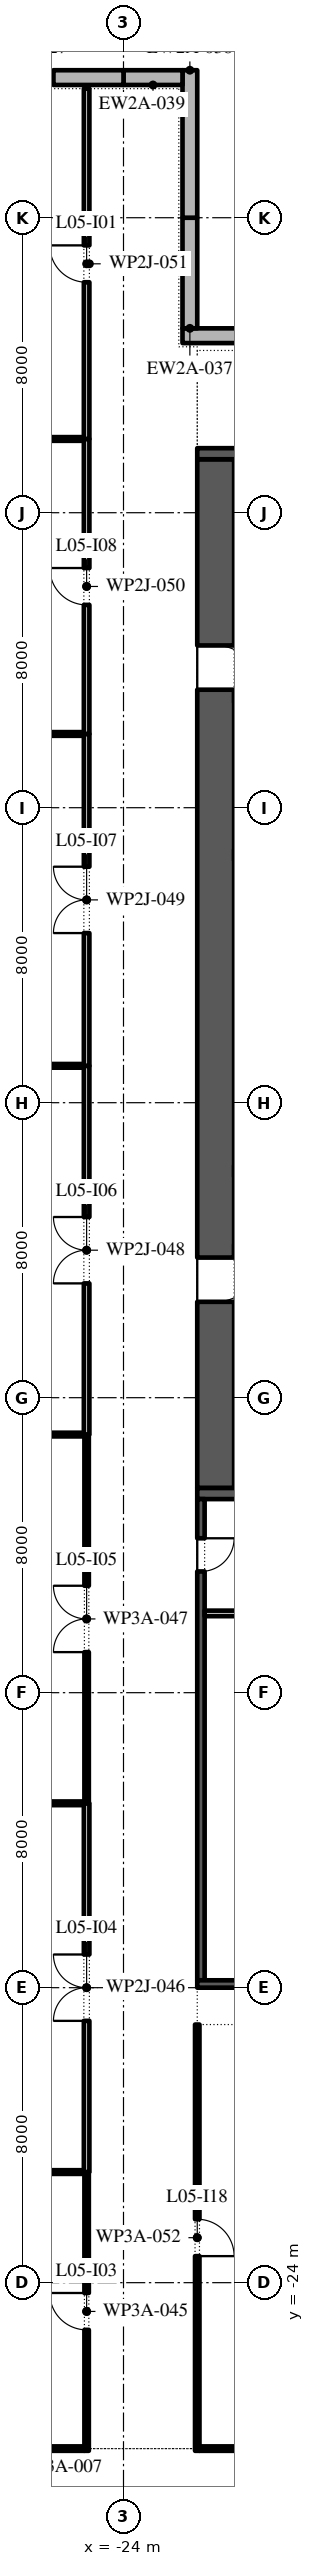
"""IFC4 building model, lengths in metres.
Left out: names, types, materials, properties, quantities, classifications, styles, units other than length and angle.
Written with IfcOpenShell. Run it as: python <this file> out.ifc"""

import sys

from ifc_helpers import new_model, si_unit, direction, frame, frame_2d, origin, place, context, subcontext, project, spatial, polyline, rectangle, outline, extrude, element, fill, save


model = new_model("IFC4")
c1 = context("Model", 3, precision=1e-05, world=origin(), true_north=direction((0.0, 1.0)))
c2 = subcontext(c1, "Body", "Model", "MODEL_VIEW")
j1 = project(units=[si_unit("LENGTHUNIT", "METRE"), si_unit("PLANEANGLEUNIT", "RADIAN")], contexts=[c1])
p1 = place(None, origin())
s1 = spatial("IfcSite", under=j1, at=p1, CompositionType="ELEMENT")
p2 = place(p1, origin())
s2 = spatial("IfcBuilding", under=s1, at=p2, CompositionType="ELEMENT")
p3 = place(p2, frame((0.0, 0.0, 28.8)))
s3 = spatial("IfcBuildingStorey", under=s2, at=p3, CompositionType="ELEMENT", Elevation=28.8)
p4 = place(p3, frame((-16.0, 28.8, 0.0), z_axis=(0.0, 0.0, 1.0), x_axis=(-1.0, 0.0, 0.0)))
e1 = element("IfcWall", 1, at=p4, inside=s3, PredefinedType="STANDARD", context=c2, shape_type="SweptSolid", body=[
    extrude(rectangle(XDim=6.4, YDim=0.4, at=frame_2d((3.2, 0.0))), origin(), (0.0, 0.0, 1.0), 4.35),
])
p5 = place(p3, frame((-22.2, 29.0, 0.0), z_axis=(0.0, 0.0, 1.0), x_axis=(0.0, 1.0, 0.0)))
e2 = element("IfcWall", 2, at=p5, inside=s3, PredefinedType="STANDARD", context=c2, shape_type="SweptSolid", body=[
    extrude(rectangle(XDim=3.0, YDim=0.4, at=frame_2d((1.5, 0.0))), origin(), (0.0, 0.0, 1.0), 4.35),
])
p6 = place(p3, frame((-22.2, 32.0, 0.0), z_axis=(0.0, 0.0, 1.0), x_axis=(0.0, 1.0, 0.0)))
e3 = element("IfcWall", 3, at=p6, inside=s3, PredefinedType="STANDARD", context=c2, shape_type="SweptSolid", body=[
    extrude(rectangle(XDim=4.0, YDim=0.4, at=frame_2d((2.0, 0.0))), origin(), (0.0, 0.0, 1.0), 4.35),
])
p7 = place(p3, frame((-22.4, 35.8, 0.0), z_axis=(0.0, 0.0, 1.0), x_axis=(-1.0, 0.0, 0.0)))
e4 = element("IfcWall", 4, at=p7, inside=s3, PredefinedType="STANDARD", context=c2, shape_type="SweptSolid", body=[
    extrude(rectangle(XDim=1.6, YDim=0.4, at=frame_2d((0.8, 0.0))), origin(), (0.0, 0.0, 1.0), 4.35),
])
p8 = place(p3, frame((-24.0, 35.8, 0.0), z_axis=(0.0, 0.0, 1.0), x_axis=(-1.0, 0.0, 0.0)))
e5 = element("IfcWall", 5, at=p8, inside=s3, PredefinedType="STANDARD", context=c2, shape_type="SweptSolid", body=[
    extrude(rectangle(XDim=8.0, YDim=0.4, at=frame_2d((4.0, 0.0))), origin(), (0.0, 0.0, 1.0), 4.35),
])
p9 = place(p8, frame((1.9, 0.0, 0.9)))
e6 = element("IfcOpeningElement", 6, at=p9, cuts=e5, PredefinedType="OPENING", context=c2, shape_type="SweptSolid", body=[
    extrude(outline(polyline([(0.0, 0.0), (1.8, 0.0), (1.8, 1.425), (1.784, 1.646), (1.738, 1.864), (1.661, 2.072), (1.556, 2.268), (1.425, 2.447), (1.269, 2.605), (1.093, 2.741), (0.9, 2.85), (0.707, 2.741), (0.531, 2.605), (0.375, 2.447), (0.244, 2.268), (0.139, 2.072), (0.062, 1.864), (0.016, 1.646), (0.0, 1.425), (0.0, 0.0)])), frame((0.0, 0.21, 0.0), z_axis=(0.0, -1.0, 0.0), x_axis=(1.0, 0.0, 0.0)), (0.0, 0.0, 1.0), 0.42),
])
p10 = place(p8, frame((4.3, 0.0, 0.9)))
e7 = element("IfcOpeningElement", 7, at=p10, cuts=e5, PredefinedType="OPENING", context=c2, shape_type="SweptSolid", body=[
    extrude(outline(polyline([(0.0, 0.0), (1.8, 0.0), (1.8, 1.425), (1.784, 1.646), (1.738, 1.864), (1.661, 2.072), (1.556, 2.268), (1.425, 2.447), (1.269, 2.605), (1.093, 2.741), (0.9, 2.85), (0.707, 2.741), (0.531, 2.605), (0.375, 2.447), (0.244, 2.268), (0.139, 2.072), (0.062, 1.864), (0.016, 1.646), (0.0, 1.425), (0.0, 0.0)])), frame((0.0, 0.21, 0.0), z_axis=(0.0, -1.0, 0.0), x_axis=(1.0, 0.0, 0.0)), (0.0, 0.0, 1.0), 0.42),
])
p11 = place(p3, frame((-21.5, -2.45, 0.0), z_axis=(0.0, 0.0, 1.0), x_axis=(0.0, 1.0, 0.0)))
e8 = element("IfcWall", 8, at=p11, inside=s3, PredefinedType="SHEAR", context=c2, shape_type="SweptSolid", body=[
    extrude(rectangle(XDim=27.9, YDim=1.0, at=frame_2d((13.95, 0.0))), origin(), (0.0, 0.0, 1.0), 4.35),
])
p12 = place(p11, frame((5.05, 0.0, 0.0)))
e9 = element("IfcOpeningElement", 9, at=p12, cuts=e8, PredefinedType="OPENING", context=c2, shape_type="SweptSolid", body=[
    extrude(rectangle(XDim=1.2, YDim=2.1, at=frame_2d((0.6, 1.05))), frame((0.0, 0.51, 0.0), z_axis=(0.0, -1.0, 0.0), x_axis=(1.0, 0.0, 0.0)), (0.0, 0.0, 1.0), 1.02),
])
p13 = place(p11, frame((21.65, 0.0, 0.0)))
e10 = element("IfcOpeningElement", 10, at=p13, cuts=e8, PredefinedType="OPENING", context=c2, shape_type="SweptSolid", body=[
    extrude(rectangle(XDim=1.2, YDim=2.1, at=frame_2d((0.6, 1.05))), frame((0.0, 0.51, 0.0), z_axis=(0.0, -1.0, 0.0), x_axis=(1.0, 0.0, 0.0)), (0.0, 0.0, 1.0), 1.02),
])
for number, where, z_axis, x_axis in (
    (11, (-22.0, -2.6, 0.0), (0.0, 0.0, 1.0), (1.0, 0.0, 0.0)),
    (12, (-22.0, 25.6, 0.0), (0.0, 0.0, 1.0), (1.0, 0.0, 0.0)),
):
    element("IfcWall", number, at=place(p3, frame(where, z_axis=z_axis, x_axis=x_axis)), inside=s3, PredefinedType="SHEAR", context=c2, shape_type="SweptSolid", body=[
        extrude(rectangle(XDim=12.0, YDim=0.3, at=frame_2d((6.0, 0.0))), origin(), (0.0, 0.0, 1.0), 4.35),
    ])
p14 = place(p3, frame((-21.9, -15.8, 0.0), z_axis=(0.0, 0.0, 1.0), x_axis=(0.0, 1.0, 0.0)))
e13 = element("IfcWall", 13, at=p14, inside=s3, PredefinedType="SHEAR", context=c2, shape_type="SweptSolid", body=[
    extrude(rectangle(XDim=13.05, YDim=0.2, at=frame_2d((6.525, 0.0))), origin(), (0.0, 0.0, 1.0), 4.35),
])
p15 = place(p14, frame((11.087, 0.0, 0.0)))
e14 = element("IfcOpeningElement", 14, at=p15, cuts=e13, PredefinedType="OPENING", context=c2, shape_type="SweptSolid", body=[
    extrude(rectangle(XDim=0.9, YDim=2.1, at=frame_2d((0.45, 1.05))), frame((0.0, 0.11, 0.0), z_axis=(0.0, -1.0, 0.0), x_axis=(1.0, 0.0, 0.0)), (0.0, 0.0, 1.0), 0.22),
])
p16 = place(p3, frame((-22.0, -15.9, 0.0), z_axis=(0.0, 0.0, 1.0), x_axis=(1.0, 0.0, 0.0)))
e15 = element("IfcWall", 15, at=p16, inside=s3, PredefinedType="SHEAR", context=c2, shape_type="SweptSolid", body=[
    extrude(rectangle(XDim=12.0, YDim=0.2, at=frame_2d((6.0, 0.0))), origin(), (0.0, 0.0, 1.0), 4.35),
])
p17 = place(p3, frame((-21.8, -5.85, 0.0), z_axis=(0.0, 0.0, 1.0), x_axis=(1.0, 0.0, 0.0)))
e16 = element("IfcWall", 16, at=p17, inside=s3, PredefinedType="PARTITIONING", context=c2, shape_type="SweptSolid", body=[
    extrude(rectangle(XDim=11.6, YDim=0.15, at=frame_2d((5.8, 0.0))), origin(), (0.0, 0.0, 1.0), 4.35),
])
p18 = place(p3, frame((-27.0, -28.5, 0.0), z_axis=(0.0, 0.0, 1.0), x_axis=(1.0, 0.0, 0.0)))
e17 = element("IfcWall", 17, at=p18, inside=s3, PredefinedType="PARTITIONING", context=c2, shape_type="SweptSolid", body=[
    extrude(rectangle(XDim=1.94, YDim=0.12, at=frame_2d((0.97, 0.0))), origin(), (0.0, 0.0, 1.0), 4.35),
])
p19 = place(p3, frame((-21.94, -28.5, 0.0), z_axis=(0.0, 0.0, 1.0), x_axis=(1.0, 0.0, 0.0)))
e18 = element("IfcWall", 18, at=p19, inside=s3, PredefinedType="PARTITIONING", context=c2, shape_type="SweptSolid", body=[
    extrude(rectangle(XDim=11.54, YDim=0.12, at=frame_2d((5.77, 0.0))), origin(), (0.0, 0.0, 1.0), 4.35),
])
p20 = place(p3, frame((-43.5, -21.0, 0.0), z_axis=(0.0, 0.0, 1.0), x_axis=(1.0, 0.0, 0.0)))
e19 = element("IfcWall", 19, at=p20, inside=s3, PredefinedType="PARTITIONING", context=c2, shape_type="SweptSolid", body=[
    extrude(rectangle(XDim=18.425, YDim=0.1, at=frame_2d((9.212, 0.0))), origin(), (0.0, 0.0, 1.0), 4.35),
])
p21 = place(p3, frame((-31.7, -11.0, 0.0), z_axis=(0.0, 0.0, 1.0), x_axis=(1.0, 0.0, 0.0)))
e20 = element("IfcWall", 20, at=p21, inside=s3, PredefinedType="PARTITIONING", context=c2, shape_type="SweptSolid", body=[
    extrude(rectangle(XDim=6.625, YDim=0.1, at=frame_2d((3.312, 0.0))), origin(), (0.0, 0.0, 1.0), 4.35),
])
p22 = place(p3, frame((-43.5, -1.0, 0.0), z_axis=(0.0, 0.0, 1.0), x_axis=(1.0, 0.0, 0.0)))
e21 = element("IfcWall", 21, at=p22, inside=s3, PredefinedType="PARTITIONING", context=c2, shape_type="SweptSolid", body=[
    extrude(rectangle(XDim=18.425, YDim=0.1, at=frame_2d((9.212, 0.0))), origin(), (0.0, 0.0, 1.0), 4.35),
])
p23 = place(p3, frame((-41.5, 9.0, 0.0), z_axis=(0.0, 0.0, 1.0), x_axis=(1.0, 0.0, 0.0)))
e22 = element("IfcWall", 22, at=p23, inside=s3, PredefinedType="PARTITIONING", context=c2, shape_type="SweptSolid", body=[
    extrude(rectangle(XDim=16.425, YDim=0.1, at=frame_2d((8.212, 0.0))), origin(), (0.0, 0.0, 1.0), 4.35),
])
p24 = place(p3, frame((-43.5, 18.0, 0.0), z_axis=(0.0, 0.0, 1.0), x_axis=(1.0, 0.0, 0.0)))
e23 = element("IfcWall", 23, at=p24, inside=s3, PredefinedType="PARTITIONING", context=c2, shape_type="SweptSolid", body=[
    extrude(rectangle(XDim=18.425, YDim=0.1, at=frame_2d((9.212, 0.0))), origin(), (0.0, 0.0, 1.0), 4.35),
])
p25 = place(p3, frame((-34.0, 26.0, 0.0), z_axis=(0.0, 0.0, 1.0), x_axis=(1.0, 0.0, 0.0)))
e24 = element("IfcWall", 24, at=p25, inside=s3, PredefinedType="PARTITIONING", context=c2, shape_type="SweptSolid", body=[
    extrude(rectangle(XDim=8.925, YDim=0.1, at=frame_2d((4.462, 0.0))), origin(), (0.0, 0.0, 1.0), 4.35),
])
p26 = place(p3, frame((-25.0, -28.56, 0.0), z_axis=(0.0, 0.0, 1.0), x_axis=(0.0, 1.0, 0.0)))
e25 = element("IfcWall", 25, at=p26, inside=s3, PredefinedType="PARTITIONING", context=c2, shape_type="SweptSolid", body=[
    extrude(rectangle(XDim=7.56, YDim=0.12, at=frame_2d((3.78, 0.0))), origin(), (0.0, 0.0, 1.0), 4.35),
])
p27 = place(p26, frame((3.28, 0.0, 0.0)))
e26 = element("IfcOpeningElement", 26, at=p27, cuts=e25, PredefinedType="OPENING", context=c2, shape_type="SweptSolid", body=[
    extrude(rectangle(XDim=1.0, YDim=2.1, at=frame_2d((0.5, 1.05))), frame((0.0, 0.07, 0.0), z_axis=(0.0, -1.0, 0.0), x_axis=(1.0, 0.0, 0.0)), (0.0, 0.0, 1.0), 0.14),
])
p28 = place(p3, frame((-25.0, -21.0, 0.0), z_axis=(0.0, 0.0, 1.0), x_axis=(0.0, 1.0, 0.0)))
e27 = element("IfcWall", 27, at=p28, inside=s3, PredefinedType="PARTITIONING", context=c2, shape_type="SweptSolid", body=[
    extrude(rectangle(XDim=10.0, YDim=0.15, at=frame_2d((5.0, 0.0))), origin(), (0.0, 0.0, 1.0), 4.35),
])
p29 = place(p28, frame((4.1, 0.0, 0.0)))
e28 = element("IfcOpeningElement", 28, at=p29, cuts=e27, PredefinedType="OPENING", context=c2, shape_type="SweptSolid", body=[
    extrude(rectangle(XDim=1.8, YDim=2.1, at=frame_2d((0.9, 1.05))), frame((0.0, 0.085, 0.0), z_axis=(0.0, -1.0, 0.0), x_axis=(1.0, 0.0, 0.0)), (0.0, 0.0, 1.0), 0.17),
])
p30 = place(p3, frame((-25.0, -11.0, 0.0), z_axis=(0.0, 0.0, 1.0), x_axis=(0.0, 1.0, 0.0)))
e29 = element("IfcWall", 29, at=p30, inside=s3, PredefinedType="PARTITIONING", context=c2, shape_type="SweptSolid", body=[
    extrude(rectangle(XDim=10.0, YDim=0.12, at=frame_2d((5.0, 0.0))), origin(), (0.0, 0.0, 1.0), 4.35),
])
p31 = place(p30, frame((4.1, 0.0, 0.0)))
e30 = element("IfcOpeningElement", 30, at=p31, cuts=e29, PredefinedType="OPENING", context=c2, shape_type="SweptSolid", body=[
    extrude(rectangle(XDim=1.8, YDim=2.1, at=frame_2d((0.9, 1.05))), frame((0.0, 0.07, 0.0), z_axis=(0.0, -1.0, 0.0), x_axis=(1.0, 0.0, 0.0)), (0.0, 0.0, 1.0), 0.14),
])
p32 = place(p3, frame((-25.0, -1.0, 0.0), z_axis=(0.0, 0.0, 1.0), x_axis=(0.0, 1.0, 0.0)))
e31 = element("IfcWall", 31, at=p32, inside=s3, PredefinedType="PARTITIONING", context=c2, shape_type="SweptSolid", body=[
    extrude(rectangle(XDim=10.0, YDim=0.15, at=frame_2d((5.0, 0.0))), origin(), (0.0, 0.0, 1.0), 4.35),
])
p33 = place(p32, frame((4.1, 0.0, 0.0)))
e32 = element("IfcOpeningElement", 32, at=p33, cuts=e31, PredefinedType="OPENING", context=c2, shape_type="SweptSolid", body=[
    extrude(rectangle(XDim=1.8, YDim=2.1, at=frame_2d((0.9, 1.05))), frame((0.0, 0.085, 0.0), z_axis=(0.0, -1.0, 0.0), x_axis=(1.0, 0.0, 0.0)), (0.0, 0.0, 1.0), 0.17),
])
p34 = place(p3, frame((-25.0, 9.0, 0.0), z_axis=(0.0, 0.0, 1.0), x_axis=(0.0, 1.0, 0.0)))
e33 = element("IfcWall", 33, at=p34, inside=s3, PredefinedType="PARTITIONING", context=c2, shape_type="SweptSolid", body=[
    extrude(rectangle(XDim=9.0, YDim=0.15, at=frame_2d((4.5, 0.0))), origin(), (0.0, 0.0, 1.0), 4.35),
])
p35 = place(p34, frame((3.6, 0.0, 0.0)))
e34 = element("IfcOpeningElement", 34, at=p35, cuts=e33, PredefinedType="OPENING", context=c2, shape_type="SweptSolid", body=[
    extrude(rectangle(XDim=1.8, YDim=2.1, at=frame_2d((0.9, 1.05))), frame((0.0, 0.085, 0.0), z_axis=(0.0, -1.0, 0.0), x_axis=(1.0, 0.0, 0.0)), (0.0, 0.0, 1.0), 0.17),
])
p36 = place(p3, frame((-25.0, 18.0, 0.0), z_axis=(0.0, 0.0, 1.0), x_axis=(0.0, 1.0, 0.0)))
e35 = element("IfcWall", 35, at=p36, inside=s3, PredefinedType="PARTITIONING", context=c2, shape_type="SweptSolid", body=[
    extrude(rectangle(XDim=8.0, YDim=0.15, at=frame_2d((4.0, 0.0))), origin(), (0.0, 0.0, 1.0), 4.35),
])
p37 = place(p36, frame((3.5, 0.0, 0.0)))
e36 = element("IfcOpeningElement", 36, at=p37, cuts=e35, PredefinedType="OPENING", context=c2, shape_type="SweptSolid", body=[
    extrude(rectangle(XDim=1.0, YDim=2.1, at=frame_2d((0.5, 1.05))), frame((0.0, 0.085, 0.0), z_axis=(0.0, -1.0, 0.0), x_axis=(1.0, 0.0, 0.0)), (0.0, 0.0, 1.0), 0.17),
])
p38 = place(p3, frame((-25.0, 26.0, 0.0), z_axis=(0.0, 0.0, 1.0), x_axis=(0.0, 1.0, 0.0)))
e37 = element("IfcWall", 37, at=p38, inside=s3, PredefinedType="PARTITIONING", context=c2, shape_type="SweptSolid", body=[
    extrude(rectangle(XDim=9.5, YDim=0.15, at=frame_2d((4.75, 0.0))), origin(), (0.0, 0.0, 1.0), 4.35),
])
p39 = place(p38, frame((4.25, 0.0, 0.0)))
e38 = element("IfcOpeningElement", 38, at=p39, cuts=e37, PredefinedType="OPENING", context=c2, shape_type="SweptSolid", body=[
    extrude(rectangle(XDim=1.0, YDim=2.1, at=frame_2d((0.5, 1.05))), frame((0.0, 0.085, 0.0), z_axis=(0.0, -1.0, 0.0), x_axis=(1.0, 0.0, 0.0)), (0.0, 0.0, 1.0), 0.17),
])
p40 = place(p3, frame((-22.0, -28.56, 0.0), z_axis=(0.0, 0.0, 1.0), x_axis=(0.0, 1.0, 0.0)))
e39 = element("IfcWall", 39, at=p40, inside=s3, PredefinedType="PARTITIONING", context=c2, shape_type="SweptSolid", body=[
    extrude(rectangle(XDim=11.56, YDim=0.12, at=frame_2d((5.78, 0.0))), origin(), (0.0, 0.0, 1.0), 4.35),
])
p41 = place(p40, frame((5.28, 0.0, 0.0)))
e40 = element("IfcOpeningElement", 40, at=p41, cuts=e39, PredefinedType="OPENING", context=c2, shape_type="SweptSolid", body=[
    extrude(rectangle(XDim=1.0, YDim=2.1, at=frame_2d((0.5, 1.05))), frame((0.0, 0.07, 0.0), z_axis=(0.0, -1.0, 0.0), x_axis=(1.0, 0.0, 0.0)), (0.0, 0.0, 1.0), 0.14),
])
p42 = place(p9, origin())
e41 = element("IfcWindow", 41, at=p42, inside=s3, PartitioningType="DOUBLE_PANEL_VERTICAL", PredefinedType="WINDOW", context=c2, shape_type="SweptSolid", body=[
    extrude(outline(polyline([(0.0, 0.0), (1.8, 0.0), (1.8, 1.425), (1.784, 1.646), (1.738, 1.864), (1.661, 2.072), (1.556, 2.268), (1.425, 2.447), (1.269, 2.605), (1.093, 2.741), (0.9, 2.85), (0.707, 2.741), (0.531, 2.605), (0.375, 2.447), (0.244, 2.268), (0.139, 2.072), (0.062, 1.864), (0.016, 1.646), (0.0, 1.425), (0.0, 0.0)])), frame((0.0, 0.03, 0.0), z_axis=(0.0, -1.0, 0.0), x_axis=(1.0, 0.0, 0.0)), (0.0, 0.0, 1.0), 0.06),
])
fill(e6, e41)
p43 = place(p12, frame((1.2, 0.0, 0.0), z_axis=(0.0, 0.0, 1.0), x_axis=(-1.0, 0.0, 0.0)))
e42 = element("IfcDoor", 42, at=p43, inside=s3, OperationType="SINGLE_SWING_RIGHT", PredefinedType="DOOR", context=c2, shape_type="SweptSolid", body=[
    extrude(rectangle(XDim=1.2, YDim=2.1, at=frame_2d((0.6, 1.05))), frame((0.0, 0.025, 0.0), z_axis=(0.0, -1.0, 0.0), x_axis=(1.0, 0.0, 0.0)), (0.0, 0.0, 1.0), 0.05),
])
fill(e9, e42)
p44 = place(p13, frame((1.2, 0.0, 0.0), z_axis=(0.0, 0.0, 1.0), x_axis=(-1.0, 0.0, 0.0)))
e43 = element("IfcDoor", 43, at=p44, inside=s3, OperationType="SINGLE_SWING_LEFT", PredefinedType="DOOR", context=c2, shape_type="SweptSolid", body=[
    extrude(rectangle(XDim=1.2, YDim=2.1, at=frame_2d((0.6, 1.05))), frame((0.0, 0.025, 0.0), z_axis=(0.0, -1.0, 0.0), x_axis=(1.0, 0.0, 0.0)), (0.0, 0.0, 1.0), 0.05),
])
fill(e10, e43)
p45 = place(p15, frame((0.9, -0.15, 0.0), z_axis=(0.0, 0.0, 1.0), x_axis=(-1.0, 0.0, 0.0)))
e44 = element("IfcDoor", 44, at=p45, inside=s3, OperationType="SINGLE_SWING_RIGHT", PredefinedType="DOOR", context=c2, shape_type="SweptSolid", body=[
    extrude(rectangle(XDim=0.9, YDim=2.1, at=frame_2d((0.45, 1.05))), frame((0.0, -0.05, 0.0), z_axis=(0.0, -1.0, 0.0), x_axis=(1.0, 0.0, 0.0)), (0.0, 0.0, 1.0), 0.05),
])
fill(e14, e44)
p46 = place(p39, origin())
e45 = element("IfcDoor", 45, at=p46, inside=s3, OperationType="SINGLE_SWING_LEFT", PredefinedType="DOOR", context=c2, shape_type="SweptSolid", body=[
    extrude(rectangle(XDim=1.0, YDim=2.1, at=frame_2d((0.5, 1.05))), frame((0.0, 0.025, 0.0), z_axis=(0.0, -1.0, 0.0), x_axis=(1.0, 0.0, 0.0)), (0.0, 0.0, 1.0), 0.05),
])
fill(e38, e45)
p47 = place(p27, origin())
e46 = element("IfcDoor", 46, at=p47, inside=s3, OperationType="SINGLE_SWING_LEFT", PredefinedType="DOOR", context=c2, shape_type="SweptSolid", body=[
    extrude(rectangle(XDim=1.0, YDim=2.1, at=frame_2d((0.5, 1.05))), frame((0.0, 0.025, 0.0), z_axis=(0.0, -1.0, 0.0), x_axis=(1.0, 0.0, 0.0)), (0.0, 0.0, 1.0), 0.05),
])
fill(e26, e46)
p48 = place(p29, origin())
e47 = element("IfcDoor", 47, at=p48, inside=s3, OperationType="SINGLE_SWING_RIGHT", PredefinedType="DOOR", context=c2, shape_type="SweptSolid", body=[
    extrude(rectangle(XDim=1.8, YDim=2.1, at=frame_2d((0.9, 1.05))), frame((0.0, 0.025, 0.0), z_axis=(0.0, -1.0, 0.0), x_axis=(1.0, 0.0, 0.0)), (0.0, 0.0, 1.0), 0.05),
])
fill(e28, e47)
p49 = place(p31, origin())
e48 = element("IfcDoor", 48, at=p49, inside=s3, OperationType="SINGLE_SWING_RIGHT", PredefinedType="DOOR", context=c2, shape_type="SweptSolid", body=[
    extrude(rectangle(XDim=1.8, YDim=2.1, at=frame_2d((0.9, 1.05))), frame((0.0, 0.025, 0.0), z_axis=(0.0, -1.0, 0.0), x_axis=(1.0, 0.0, 0.0)), (0.0, 0.0, 1.0), 0.05),
])
fill(e30, e48)
p50 = place(p33, origin())
e49 = element("IfcDoor", 49, at=p50, inside=s3, OperationType="SINGLE_SWING_RIGHT", PredefinedType="DOOR", context=c2, shape_type="SweptSolid", body=[
    extrude(rectangle(XDim=1.8, YDim=2.1, at=frame_2d((0.9, 1.05))), frame((0.0, 0.025, 0.0), z_axis=(0.0, -1.0, 0.0), x_axis=(1.0, 0.0, 0.0)), (0.0, 0.0, 1.0), 0.05),
])
fill(e32, e49)
p51 = place(p35, origin())
e50 = element("IfcDoor", 50, at=p51, inside=s3, OperationType="SINGLE_SWING_RIGHT", PredefinedType="DOOR", context=c2, shape_type="SweptSolid", body=[
    extrude(rectangle(XDim=1.8, YDim=2.1, at=frame_2d((0.9, 1.05))), frame((0.0, 0.025, 0.0), z_axis=(0.0, -1.0, 0.0), x_axis=(1.0, 0.0, 0.0)), (0.0, 0.0, 1.0), 0.05),
])
fill(e34, e50)
p52 = place(p37, origin())
e51 = element("IfcDoor", 51, at=p52, inside=s3, OperationType="SINGLE_SWING_LEFT", PredefinedType="DOOR", context=c2, shape_type="SweptSolid", body=[
    extrude(rectangle(XDim=1.0, YDim=2.1, at=frame_2d((0.5, 1.05))), frame((0.0, 0.025, 0.0), z_axis=(0.0, -1.0, 0.0), x_axis=(1.0, 0.0, 0.0)), (0.0, 0.0, 1.0), 0.05),
])
fill(e36, e51)
p53 = place(p41, frame((1.0, 0.0, 0.0), z_axis=(0.0, 0.0, 1.0), x_axis=(-1.0, 0.0, 0.0)))
e52 = element("IfcDoor", 52, at=p53, inside=s3, OperationType="SINGLE_SWING_LEFT", PredefinedType="DOOR", context=c2, shape_type="SweptSolid", body=[
    extrude(rectangle(XDim=1.0, YDim=2.1, at=frame_2d((0.5, 1.05))), frame((0.0, 0.025, 0.0), z_axis=(0.0, -1.0, 0.0), x_axis=(1.0, 0.0, 0.0)), (0.0, 0.0, 1.0), 0.05),
])
fill(e40, e52)
save(model, sys.argv[1])
